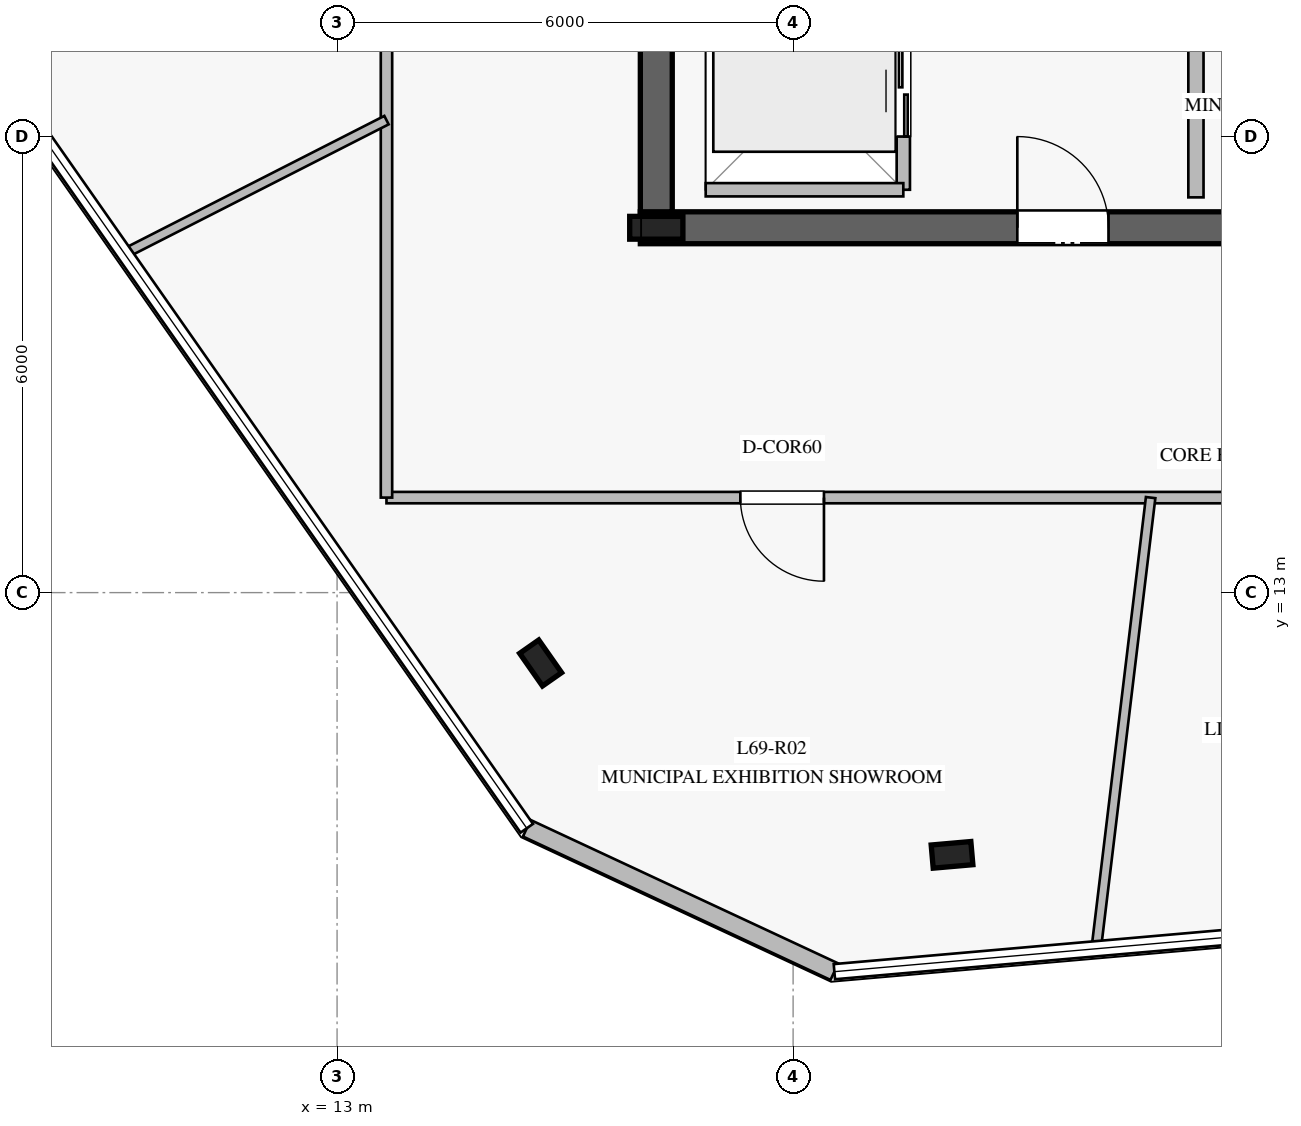
"""IFC4 building model, lengths in metres.
Left out: names, types, materials, properties, quantities, classifications, styles, units other than length and angle.
Written with IfcOpenShell. Run it as: python <this file> out.ifc"""

import sys

from ifc_helpers import new_model, si_unit, direction, frame, frame_2d, origin, origin_2d, place, context, subcontext, project, spatial, rectangle, i_section, extrude, element, fill, save


model = new_model("IFC4")
c1 = context("Model", 3, precision=1e-05, world=origin(), true_north=direction((0.0, 1.0)))
c2 = subcontext(c1, "Body", "Model", "MODEL_VIEW")
j1 = project(units=[si_unit("LENGTHUNIT", "METRE"), si_unit("PLANEANGLEUNIT", "RADIAN")], contexts=[c1])
p1 = place(None, origin())
s1 = spatial("IfcSite", under=j1, at=p1, CompositionType="ELEMENT")
p2 = place(p1, origin())
s2 = spatial("IfcBuilding", under=s1, at=p2, CompositionType="ELEMENT")
p3 = place(p2, frame((0.0, 0.0, 286.2)))
s3 = spatial("IfcBuildingStorey", under=s2, at=p3, CompositionType="ELEMENT", Elevation=286.2)
p4 = place(p3, frame((16.99, 17.8, 0.0), z_axis=(0.0, 0.0, 1.0), x_axis=(1.0, 0.0, 0.0)))
e1 = element("IfcWall", 1, at=p4, inside=s3, PredefinedType="SHEAR", context=c2, shape_type="SweptSolid", body=[
    extrude(rectangle(XDim=16.02, YDim=0.42, at=frame_2d((8.01, 0.0))), origin(), (0.0, 0.0, 1.0), 3.78),
])
p5 = place(p4, frame((4.96, 0.0, 0.0)))
e2 = element("IfcOpeningElement", 2, at=p5, cuts=e1, PredefinedType="OPENING", context=c2, shape_type="SweptSolid", body=[
    extrude(rectangle(XDim=1.2, YDim=2.25, at=frame_2d((0.6, 1.125))), frame((0.0, 0.22, 0.0), z_axis=(0.0, -1.0, 0.0), x_axis=(1.0, 0.0, 0.0)), (0.0, 0.0, 1.0), 0.44),
])
p6 = place(p4, frame((10.86, 0.0, 0.0)))
e3 = element("IfcOpeningElement", 3, at=p6, cuts=e1, PredefinedType="OPENING", context=c2, shape_type="SweptSolid", body=[
    extrude(rectangle(XDim=1.1, YDim=2.2, at=frame_2d((0.55, 1.1))), frame((0.0, 0.22, 0.0), z_axis=(0.0, -1.0, 0.0), x_axis=(1.0, 0.0, 0.0)), (0.0, 0.0, 1.0), 0.44),
])
p7 = place(p3, frame((17.2, 31.99, 0.0), z_axis=(0.0, 0.0, 1.0), x_axis=(0.0, -1.0, 0.0)))
e4 = element("IfcWall", 4, at=p7, inside=s3, PredefinedType="SHEAR", context=c2, shape_type="SweptSolid", body=[
    extrude(rectangle(XDim=13.98, YDim=0.42, at=frame_2d((6.99, 0.0))), origin(), (0.0, 0.0, 1.0), 3.78),
])
p8 = place(p7, frame((2.14, 0.0, 0.0)))
e5 = element("IfcOpeningElement", 5, at=p8, cuts=e4, PredefinedType="OPENING", context=c2, shape_type="SweptSolid", body=[
    extrude(rectangle(XDim=1.5, YDim=2.2, at=frame_2d((0.75, 1.1))), frame((0.0, 0.22, 0.0), z_axis=(0.0, -1.0, 0.0), x_axis=(1.0, 0.0, 0.0)), (0.0, 0.0, 1.0), 0.44),
])
p9 = place(p3, frame((17.2, 17.8, 0.0), z_axis=(0.0, 0.0, 1.0), x_axis=(1.0, 0.0, 0.0)))
e6 = element("IfcColumn", 6, at=p9, inside=s3, PredefinedType="COLUMN", context=c2, shape_type="SweptSolid", body=[
    extrude(i_section(OverallWidth=0.3, OverallDepth=0.7, WebThickness=0.017, FlangeThickness=0.032, at=origin_2d()), origin(), (0.0, 0.0, 1.0), 4.0),
])
for number, where, z_axis, x_axis in (
    (7, (15.678, 12.074, 0.0), (0.0, 0.0, 1.0), (-0.574, 0.819, 0.0)),
    (8, (21.091, 9.55, 0.0), (0.0, 0.0, 1.0), (0.996, 0.087, 0.0)),
):
    element("IfcColumn", number, at=place(p3, frame(where, z_axis=z_axis, x_axis=x_axis)), inside=s3, PredefinedType="COLUMN", context=c2, shape_type="SweptSolid", body=[
        extrude(i_section(OverallWidth=0.306, OverallDepth=0.524, WebThickness=0.021, FlangeThickness=0.04, at=origin_2d()), origin(), (0.0, 0.0, 1.0), 4.0),
    ])
p10 = place(p3, frame((15.496, 9.9, 0.0), z_axis=(0.0, 0.0, 1.0), x_axis=(0.906318587574, -0.422595099141, 0.0)))
e9 = element("IfcWall", 9, at=p10, inside=s3, PredefinedType="STANDARD", context=c2, shape_type="SweptSolid", body=[
    extrude(rectangle(XDim=4.465, YDim=0.24, at=frame_2d((2.232, 0.0))), origin(), (0.0, 0.0, 1.0), 3.78),
])
p11 = place(p3, frame((24.3, 18.2, 0.0), z_axis=(0.0, 0.0, 1.0), x_axis=(0.0, 1.0, 0.0)))
e10 = element("IfcWall", 10, at=p11, inside=s3, PredefinedType="PARTITIONING", context=c2, shape_type="SweptSolid", body=[
    extrude(rectangle(XDim=5.15, YDim=0.2, at=frame_2d((2.575, 0.0))), origin(), (0.0, 0.0, 1.0), 3.78),
])
p12 = place(p3, frame((20.45, 18.3, 0.0), z_axis=(0.0, 0.0, 1.0), x_axis=(0.0, 1.0, 0.0)))
e11 = element("IfcWall", 11, at=p12, inside=s3, PredefinedType="PARTITIONING", context=c2, shape_type="SweptSolid", body=[
    extrude(rectangle(XDim=2.6, YDim=0.175, at=frame_2d((1.3, 0.0))), origin(), (0.0, 0.0, 1.0), 3.78),
])
p13 = place(p12, frame((0.7, 0.0, 0.0)))
e12 = element("IfcOpeningElement", 12, at=p13, cuts=e11, PredefinedType="OPENING", context=c2, shape_type="SweptSolid", body=[
    extrude(rectangle(XDim=1.2, YDim=2.2, at=frame_2d((0.6, 1.1))), frame((0.0, 0.098, 0.0), z_axis=(0.0, -1.0, 0.0), x_axis=(1.0, 0.0, 0.0)), (0.0, 0.0, 1.0), 0.195),
])
p14 = place(p3, frame((17.85, 18.3, 0.0), z_axis=(0.0, 0.0, 1.0), x_axis=(1.0, 0.0, 0.0)))
e13 = element("IfcWall", 13, at=p14, inside=s3, PredefinedType="PARTITIONING", context=c2, shape_type="SweptSolid", body=[
    extrude(rectangle(XDim=2.6, YDim=0.175, at=frame_2d((1.3, 0.0))), origin(), (0.0, 0.0, 1.0), 3.78),
])
p15 = place(p3, frame((36.35, 14.25, 0.0), z_axis=(0.0, 0.0, 1.0), x_axis=(-1.0, 0.0, 0.0)))
e14 = element("IfcWall", 14, at=p15, inside=s3, PredefinedType="PARTITIONING", context=c2, shape_type="SweptSolid", body=[
    extrude(rectangle(XDim=22.7, YDim=0.15, at=frame_2d((11.35, 0.0))), origin(), (0.0, 0.0, 1.0), 3.05),
])
p16 = place(p15, frame((16.944, 0.0, 0.0)))
e15 = element("IfcOpeningElement", 15, at=p16, cuts=e14, PredefinedType="OPENING", context=c2, shape_type="SweptSolid", body=[
    extrude(rectangle(XDim=1.1, YDim=2.2, at=frame_2d((0.55, 1.1))), frame((0.0, 0.085, 0.0), z_axis=(0.0, -1.0, 0.0), x_axis=(1.0, 0.0, 0.0)), (0.0, 0.0, 1.0), 0.17),
])
p17 = place(p3, frame((13.65, 14.25, 0.0), z_axis=(0.0, 0.0, 1.0), x_axis=(0.0, 1.0, 0.0)))
e16 = element("IfcWall", 16, at=p17, inside=s3, PredefinedType="PARTITIONING", context=c2, shape_type="SweptSolid", body=[
    extrude(rectangle(XDim=21.5, YDim=0.15, at=frame_2d((10.75, 0.0))), origin(), (0.0, 0.0, 1.0), 3.28),
])
p18 = place(p17, frame((9.035, 0.0, 0.0)))
e17 = element("IfcOpeningElement", 17, at=p18, cuts=e16, PredefinedType="OPENING", context=c2, shape_type="SweptSolid", body=[
    extrude(rectangle(XDim=1.1, YDim=2.2, at=frame_2d((0.55, 1.1))), frame((0.0, 0.085, 0.0), z_axis=(0.0, -1.0, 0.0), x_axis=(1.0, 0.0, 0.0)), (0.0, 0.0, 1.0), 0.17),
])
p19 = place(p3, frame((13.65, 19.216, 0.0), z_axis=(0.0, 0.0, 1.0), x_axis=(-0.891017734347, -0.453968497892, 0.0)))
e18 = element("IfcWall", 18, at=p19, inside=s3, PredefinedType="PARTITIONING", context=c2, shape_type="SweptSolid", body=[
    extrude(rectangle(XDim=3.853, YDim=0.125, at=frame_2d((1.926, 0.0))), origin(), (0.0, 0.0, 1.0), 3.28),
])
p20 = place(p3, frame((23.704, 14.25, 0.0), z_axis=(0.0, 0.0, 1.0), x_axis=(-0.119779797653, -0.992800483518, 0.0)))
e19 = element("IfcWall", 19, at=p20, inside=s3, PredefinedType="PARTITIONING", context=c2, shape_type="SweptSolid", body=[
    extrude(rectangle(XDim=5.962, YDim=0.125, at=frame_2d((2.981, 0.0))), origin(), (0.0, 0.0, 1.0), 3.05),
])
p21 = place(p5, origin())
e20 = element("IfcDoor", 20, at=p21, inside=s3, OperationType="SINGLE_SWING_LEFT", PredefinedType="DOOR", context=c2, shape_type="SweptSolid", body=[
    extrude(rectangle(XDim=1.2, YDim=2.25, at=frame_2d((0.6, 1.125))), frame((0.0, 0.025, 0.0), z_axis=(0.0, -1.0, 0.0), x_axis=(1.0, 0.0, 0.0)), (0.0, 0.0, 1.0), 0.05),
])
fill(e2, e20)
p22 = place(p13, origin())
e21 = element("IfcDoor", 21, at=p22, inside=s3, OperationType="DOUBLE_DOOR_SLIDING", PredefinedType="DOOR", context=c2, shape_type="SweptSolid", body=[
    extrude(rectangle(XDim=1.2, YDim=2.2, at=frame_2d((0.6, 1.1))), frame((0.0, 0.025, 0.0), z_axis=(0.0, -1.0, 0.0), x_axis=(1.0, 0.0, 0.0)), (0.0, 0.0, 1.0), 0.05),
])
fill(e12, e21)
p23 = place(p16, origin())
e22 = element("IfcDoor", 22, at=p23, inside=s3, OperationType="SINGLE_SWING_LEFT", PredefinedType="DOOR", context=c2, shape_type="SweptSolid", body=[
    extrude(rectangle(XDim=1.1, YDim=2.2, at=frame_2d((0.55, 1.1))), frame((0.0, 0.025, 0.0), z_axis=(0.0, -1.0, 0.0), x_axis=(1.0, 0.0, 0.0)), (0.0, 0.0, 1.0), 0.05),
])
fill(e15, e22)
save(model, sys.argv[1])
